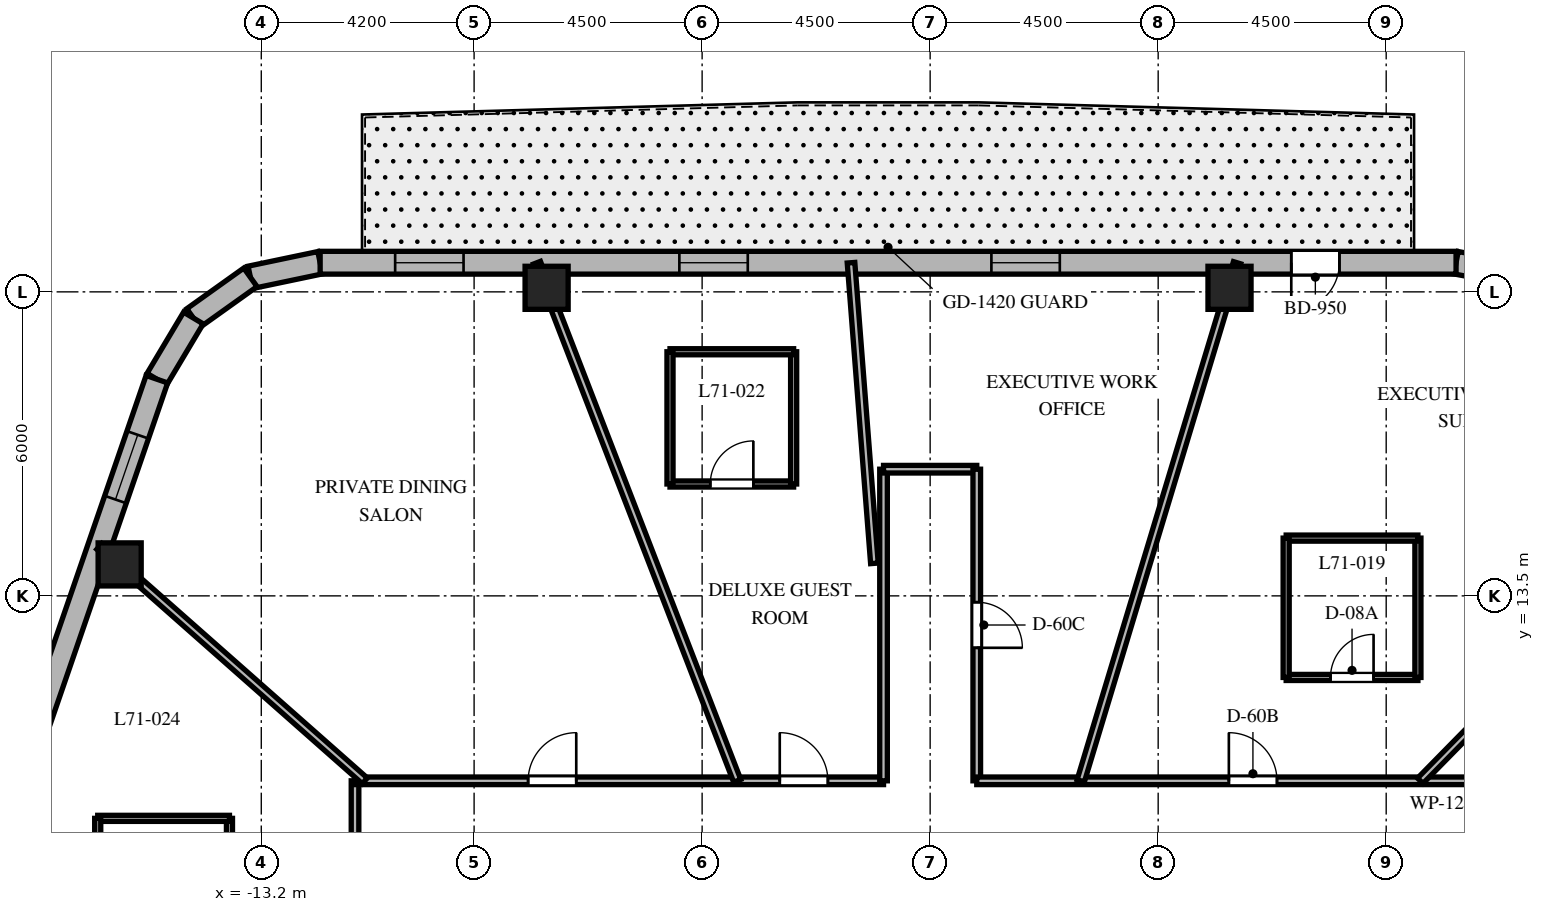
"""IFC4 building model, lengths in metres.
Left out: names, types, materials, properties, quantities, classifications, styles, units other than length and angle.
Written with IfcOpenShell. Run it as: python <this file> out.ifc"""

import sys

from ifc_helpers import new_model, si_unit, direction, frame, frame_2d, origin, origin_2d, place, context, subcontext, project, spatial, rectangle, extrude, element, fill, save


model = new_model("IFC4")
c1 = context("Model", 3, precision=1e-05, world=origin(), true_north=direction((0.0, 1.0)))
c2 = subcontext(c1, "Body", "Model", "MODEL_VIEW")
j1 = project(units=[si_unit("LENGTHUNIT", "METRE"), si_unit("PLANEANGLEUNIT", "RADIAN")], contexts=[c1])
p1 = place(None, origin())
s1 = spatial("IfcSite", under=j1, at=p1, CompositionType="ELEMENT")
p2 = place(p1, origin())
s2 = spatial("IfcBuilding", under=s1, at=p2, CompositionType="ELEMENT")
p3 = place(p2, frame((0.0, 0.0, 284.7)))
s3 = spatial("IfcBuildingStorey", under=s2, at=p3, CompositionType="ELEMENT", Elevation=284.7)
for number, where, z_axis, x_axis in (
    (1, (5.908, 19.58, 0.0), (0.0, 0.0, 1.0), (1.0, 0.0, 0.0)),
    (2, (-7.569, 19.58, 0.0), (0.0, 0.0, 1.0), (1.0, 0.0, 0.0)),
    (3, (-15.995, 14.121, 0.0), (0.0, 0.0, 1.0), (1.0, 0.0, 0.0)),
):
    element("IfcColumn", number, at=place(p3, frame(where, z_axis=z_axis, x_axis=x_axis)), inside=s3, PredefinedType="COLUMN", context=c2, shape_type="SweptSolid", body=[
        extrude(rectangle(XDim=0.85, YDim=0.85, at=origin_2d()), origin(), (0.0, 0.0, 1.0), 3.9),
    ])
p4 = place(p3, frame((11.626, 19.84, 0.0), z_axis=(0.0, 0.0, 1.0), x_axis=(-0.982701956681, 0.185194126083, 0.0)))
e4 = element("IfcWall", 4, at=p4, inside=s3, PredefinedType="SOLIDWALL", context=c2, shape_type="SweptSolid", body=[
    extrude(rectangle(XDim=1.27, YDim=0.45, at=frame_2d((0.635, 0.0))), origin(), (0.0, 0.0, 1.0), 3.58),
])
p5 = place(p3, frame((-12.038, 20.075, 0.0), z_axis=(0.0, 0.0, 1.0), x_axis=(-0.978750122553, -0.205056571711, 0.0)))
e5 = element("IfcWall", 5, at=p5, inside=s3, PredefinedType="SOLIDWALL", context=c2, shape_type="SweptSolid", body=[
    extrude(rectangle(XDim=1.406, YDim=0.45, at=frame_2d((0.703, 0.0))), origin(), (0.0, 0.0, 1.0), 3.58),
])
p6 = place(p3, frame((-13.415, 19.787, 0.0), z_axis=(0.0, 0.0, 1.0), x_axis=(-0.814055493997, -0.580787097561, 0.0)))
e6 = element("IfcWall", 6, at=p6, inside=s3, PredefinedType="SOLIDWALL", context=c2, shape_type="SweptSolid", body=[
    extrude(rectangle(XDim=1.383, YDim=0.45, at=frame_2d((0.691, 0.0))), origin(), (0.0, 0.0, 1.0), 3.58),
])
p7 = place(p3, frame((-14.54, 18.984, 0.0), z_axis=(0.0, 0.0, 1.0), x_axis=(-0.512374906623, -0.858761873317, 0.0)))
e7 = element("IfcWall", 7, at=p7, inside=s3, PredefinedType="SOLIDWALL", context=c2, shape_type="SweptSolid", body=[
    extrude(rectangle(XDim=1.406, YDim=0.45, at=frame_2d((0.703, 0.0))), origin(), (0.0, 0.0, 1.0), 3.58),
])
p8 = place(p3, frame((10.379, 20.075, 0.0), z_axis=(0.0, 0.0, 1.0), x_axis=(-1.0, 0.0, 0.0)))
e8 = element("IfcWall", 8, at=p8, inside=s3, PredefinedType="SOLIDWALL", context=c2, shape_type="SweptSolid", body=[
    extrude(rectangle(XDim=22.417, YDim=0.45, at=frame_2d((11.208, 0.0))), origin(), (0.0, 0.0, 1.0), 3.58),
])
p9 = place(p8, frame((2.302, 0.0, 0.0)))
e9 = element("IfcOpeningElement", 9, at=p9, cuts=e8, PredefinedType="OPENING", context=c2, shape_type="SweptSolid", body=[
    extrude(rectangle(XDim=0.95, YDim=2.15, at=frame_2d((0.475, 1.075))), frame((0.0, 0.235, 0.0), z_axis=(0.0, -1.0, 0.0), x_axis=(1.0, 0.0, 0.0)), (0.0, 0.0, 1.0), 0.47),
])
p10 = place(p8, frame((7.82, 0.0, 0.8)))
e10 = element("IfcOpeningElement", 10, at=p10, cuts=e8, PredefinedType="OPENING", context=c2, shape_type="SweptSolid", body=[
    extrude(rectangle(XDim=1.35, YDim=1.75, at=frame_2d((0.675, 0.875))), frame((0.0, 0.235, 0.0), z_axis=(0.0, -1.0, 0.0), x_axis=(1.0, 0.0, 0.0)), (0.0, 0.0, 1.0), 0.47),
])
p11 = place(p8, frame((13.978, 0.0, 0.8)))
e11 = element("IfcOpeningElement", 11, at=p11, cuts=e8, PredefinedType="OPENING", context=c2, shape_type="SweptSolid", body=[
    extrude(rectangle(XDim=1.35, YDim=1.75, at=frame_2d((0.675, 0.875))), frame((0.0, 0.235, 0.0), z_axis=(0.0, -1.0, 0.0), x_axis=(1.0, 0.0, 0.0)), (0.0, 0.0, 1.0), 0.47),
])
p12 = place(p8, frame((19.587, 0.0, 0.8)))
e12 = element("IfcOpeningElement", 12, at=p12, cuts=e8, PredefinedType="OPENING", context=c2, shape_type="SweptSolid", body=[
    extrude(rectangle(XDim=1.35, YDim=1.75, at=frame_2d((0.675, 0.875))), frame((0.0, 0.235, 0.0), z_axis=(0.0, -1.0, 0.0), x_axis=(1.0, 0.0, 0.0)), (0.0, 0.0, 1.0), 0.47),
])
p13 = place(p3, frame((-15.26, 17.776, 0.0), z_axis=(0.0, 0.0, 1.0), x_axis=(-0.325407437101, -0.945573899745, 0.0)))
e13 = element("IfcWall", 13, at=p13, inside=s3, PredefinedType="SOLIDWALL", context=c2, shape_type="SweptSolid", body=[
    extrude(rectangle(XDim=18.552, YDim=0.45, at=frame_2d((9.276, 0.0))), origin(), (0.0, 0.0, 1.0), 3.58),
])
p14 = place(p13, frame((1.161, 0.0, 0.8)))
e14 = element("IfcOpeningElement", 14, at=p14, cuts=e13, PredefinedType="OPENING", context=c2, shape_type="SweptSolid", body=[
    extrude(rectangle(XDim=1.35, YDim=1.75, at=frame_2d((0.675, 0.875))), frame((0.0, 0.235, 0.0), z_axis=(0.0, -1.0, 0.0), x_axis=(1.0, 0.0, 0.0)), (0.0, 0.0, 1.0), 0.47),
])
p15 = place(p13, frame((8.548, 0.0, 0.8)))
e15 = element("IfcOpeningElement", 15, at=p15, cuts=e13, PredefinedType="OPENING", context=c2, shape_type="SweptSolid", body=[
    extrude(rectangle(XDim=1.35, YDim=1.75, at=frame_2d((0.675, 0.875))), frame((0.0, 0.235, 0.0), z_axis=(0.0, -1.0, 0.0), x_axis=(1.0, 0.0, 0.0)), (0.0, 0.0, 1.0), 0.47),
])
p16 = place(p13, frame((15.987, 0.0, 0.8)))
e16 = element("IfcOpeningElement", 16, at=p16, cuts=e13, PredefinedType="OPENING", context=c2, shape_type="SweptSolid", body=[
    extrude(rectangle(XDim=1.35, YDim=1.75, at=frame_2d((0.675, 0.875))), frame((0.0, 0.235, 0.0), z_axis=(0.0, -1.0, 0.0), x_axis=(1.0, 0.0, 0.0)), (0.0, 0.0, 1.0), 0.47),
])
p17 = place(p3, frame((-11.35, 4.4, 0.0), z_axis=(0.0, 0.0, 1.0), x_axis=(0.0, 1.0, 0.0)))
e17 = element("IfcWall", 17, at=p17, inside=s3, PredefinedType="PARTITIONING", context=c2, shape_type="SweptSolid", body=[
    extrude(rectangle(XDim=5.45, YDim=0.15, at=frame_2d((2.725, 0.0))), origin(), (0.0, 0.0, 1.0), 3.07),
])
p18 = place(p3, frame((-11.35, 9.85, 0.0), z_axis=(0.0, 0.0, 1.0), x_axis=(1.0, 0.0, 0.0)))
e18 = element("IfcWall", 18, at=p18, inside=s3, PredefinedType="PARTITIONING", context=c2, shape_type="SweptSolid", body=[
    extrude(rectangle(XDim=10.43, YDim=0.15, at=frame_2d((5.215, 0.0))), origin(), (0.0, 0.0, 1.0), 3.07),
])
p19 = place(p18, frame((8.382, 0.0, 0.0)))
e19 = element("IfcOpeningElement", 19, at=p19, cuts=e18, PredefinedType="OPENING", context=c2, shape_type="SweptSolid", body=[
    extrude(rectangle(XDim=0.95, YDim=2.03, at=frame_2d((0.475, 1.015))), frame((0.0, 0.085, 0.0), z_axis=(0.0, -1.0, 0.0), x_axis=(1.0, 0.0, 0.0)), (0.0, 0.0, 1.0), 0.17),
])
p20 = place(p18, frame((3.416, 0.0, 0.0)))
e20 = element("IfcOpeningElement", 20, at=p20, cuts=e18, PredefinedType="OPENING", context=c2, shape_type="SweptSolid", body=[
    extrude(rectangle(XDim=0.95, YDim=2.03, at=frame_2d((0.475, 1.015))), frame((0.0, 0.085, 0.0), z_axis=(0.0, -1.0, 0.0), x_axis=(1.0, 0.0, 0.0)), (0.0, 0.0, 1.0), 0.17),
])
p21 = place(p3, frame((-0.92, 9.85, 0.0), z_axis=(0.0, 0.0, 1.0), x_axis=(0.0, 1.0, 0.0)))
e21 = element("IfcWall", 21, at=p21, inside=s3, PredefinedType="PARTITIONING", context=c2, shape_type="SweptSolid", body=[
    extrude(rectangle(XDim=6.15, YDim=0.15, at=frame_2d((3.075, 0.0))), origin(), (0.0, 0.0, 1.0), 3.021),
])
p22 = place(p3, frame((-0.92, 16.0, 0.0), z_axis=(0.0, 0.0, 1.0), x_axis=(1.0, 0.0, 0.0)))
e22 = element("IfcWall", 22, at=p22, inside=s3, PredefinedType="PARTITIONING", context=c2, shape_type="SweptSolid", body=[
    extrude(rectangle(XDim=1.84, YDim=0.15, at=frame_2d((0.92, 0.0))), origin(), (0.0, 0.0, 1.0), 3.58),
])
p23 = place(p3, frame((0.92, 16.0, 0.0), z_axis=(0.0, 0.0, 1.0), x_axis=(0.0, -1.0, 0.0)))
e23 = element("IfcWall", 23, at=p23, inside=s3, PredefinedType="PARTITIONING", context=c2, shape_type="SweptSolid", body=[
    extrude(rectangle(XDim=6.15, YDim=0.15, at=frame_2d((3.075, 0.0))), origin(), (0.0, 0.0, 1.0), 3.021),
])
p24 = place(p23, frame((2.625, 0.0, 0.0)))
e24 = element("IfcOpeningElement", 24, at=p24, cuts=e23, PredefinedType="OPENING", context=c2, shape_type="SweptSolid", body=[
    extrude(rectangle(XDim=0.9, YDim=2.03, at=frame_2d((0.45, 1.015))), frame((0.0, 0.085, 0.0), z_axis=(0.0, -1.0, 0.0), x_axis=(1.0, 0.0, 0.0)), (0.0, 0.0, 1.0), 0.17),
])
p25 = place(p3, frame((0.92, 9.85, 0.0), z_axis=(0.0, 0.0, 1.0), x_axis=(1.0, 0.0, 0.0)))
e25 = element("IfcWall", 25, at=p25, inside=s3, PredefinedType="PARTITIONING", context=c2, shape_type="SweptSolid", body=[
    extrude(rectangle(XDim=10.43, YDim=0.15, at=frame_2d((5.215, 0.0))), origin(), (0.0, 0.0, 1.0), 3.07),
])
p26 = place(p25, frame((4.975, 0.0, 0.0)))
e26 = element("IfcOpeningElement", 26, at=p26, cuts=e25, PredefinedType="OPENING", context=c2, shape_type="SweptSolid", body=[
    extrude(rectangle(XDim=0.95, YDim=2.03, at=frame_2d((0.475, 1.015))), frame((0.0, 0.085, 0.0), z_axis=(0.0, -1.0, 0.0), x_axis=(1.0, 0.0, 0.0)), (0.0, 0.0, 1.0), 0.17),
])
p27 = place(p3, frame((9.672, 9.85, 0.0), z_axis=(0.0, 0.0, 1.0), x_axis=(0.700629771301, 0.713524998558, 0.0)))
e27 = element("IfcWall", 27, at=p27, inside=s3, PredefinedType="PARTITIONING", context=c2, shape_type="SweptSolid", body=[
    extrude(rectangle(XDim=7.459, YDim=0.15, at=frame_2d((3.73, 0.0))), origin(), (0.0, 0.0, 1.0), 2.92),
])
p28 = place(p3, frame((2.972, 9.85, 0.0), z_axis=(0.0, 0.0, 1.0), x_axis=(0.288872169679, 0.957367677324, 0.0)))
e28 = element("IfcWall", 28, at=p28, inside=s3, PredefinedType="PARTITIONING", context=c2, shape_type="SweptSolid", body=[
    extrude(rectangle(XDim=10.68, YDim=0.15, at=frame_2d((5.34, 0.0))), origin(), (0.0, 0.0, 1.0), 2.92),
])
p29 = place(p3, frame((-1.1, 14.142, 0.0), z_axis=(0.0, 0.0, 1.0), x_axis=(-0.077534071454, 0.996989702938, 0.0)))
e29 = element("IfcWall", 29, at=p29, inside=s3, PredefinedType="PARTITIONING", context=c2, shape_type="SweptSolid", body=[
    extrude(rectangle(XDim=5.951, YDim=0.15, at=frame_2d((2.976, 0.0))), origin(), (0.0, 0.0, 1.0), 2.92),
])
p30 = place(p3, frame((-3.808, 9.85, 0.0), z_axis=(0.0, 0.0, 1.0), x_axis=(-0.360587327934, 0.932725457427, 0.0)))
e30 = element("IfcWall", 30, at=p30, inside=s3, PredefinedType="PARTITIONING", context=c2, shape_type="SweptSolid", body=[
    extrude(rectangle(XDim=10.962, YDim=0.15, at=frame_2d((5.481, 0.0))), origin(), (0.0, 0.0, 1.0), 2.92),
])
p31 = place(p3, frame((-11.157, 9.85, 0.0), z_axis=(0.0, 0.0, 1.0), x_axis=(-0.74966962095, 0.661812253909, 0.0)))
e31 = element("IfcWall", 31, at=p31, inside=s3, PredefinedType="PARTITIONING", context=c2, shape_type="SweptSolid", body=[
    extrude(rectangle(XDim=6.989, YDim=0.15, at=frame_2d((3.494, 0.0))), origin(), (0.0, 0.0, 1.0), 2.92),
])
p32 = place(p3, frame((7.026, 11.89, 0.0), z_axis=(0.0, 0.0, 1.0), x_axis=(1.0, 0.0, 0.0)))
e32 = element("IfcWall", 32, at=p32, inside=s3, PredefinedType="PARTITIONING", context=c2, shape_type="SweptSolid", body=[
    extrude(rectangle(XDim=2.6, YDim=0.12, at=frame_2d((1.3, 0.0))), origin(), (0.0, 0.0, 1.0), 3.021),
])
p33 = place(p32, frame((0.875, 0.0, 0.0)))
e33 = element("IfcOpeningElement", 33, at=p33, cuts=e32, PredefinedType="OPENING", context=c2, shape_type="SweptSolid", body=[
    extrude(rectangle(XDim=0.85, YDim=2.03, at=frame_2d((0.425, 1.015))), frame((0.0, 0.07, 0.0), z_axis=(0.0, -1.0, 0.0), x_axis=(1.0, 0.0, 0.0)), (0.0, 0.0, 1.0), 0.14),
])
p34 = place(p3, frame((9.626, 11.89, 0.0), z_axis=(0.0, 0.0, 1.0), x_axis=(0.0, 1.0, 0.0)))
e34 = element("IfcWall", 34, at=p34, inside=s3, PredefinedType="PARTITIONING", context=c2, shape_type="SweptSolid", body=[
    extrude(rectangle(XDim=2.75, YDim=0.12, at=frame_2d((1.375, 0.0))), origin(), (0.0, 0.0, 1.0), 3.152),
])
p35 = place(p3, frame((9.626, 14.64, 0.0), z_axis=(0.0, 0.0, 1.0), x_axis=(-1.0, 0.0, 0.0)))
e35 = element("IfcWall", 35, at=p35, inside=s3, PredefinedType="PARTITIONING", context=c2, shape_type="SweptSolid", body=[
    extrude(rectangle(XDim=2.6, YDim=0.12, at=frame_2d((1.3, 0.0))), origin(), (0.0, 0.0, 1.0), 3.152),
])
p36 = place(p3, frame((7.026, 14.64, 0.0), z_axis=(0.0, 0.0, 1.0), x_axis=(0.0, -1.0, 0.0)))
e36 = element("IfcWall", 36, at=p36, inside=s3, PredefinedType="PARTITIONING", context=c2, shape_type="SweptSolid", body=[
    extrude(rectangle(XDim=2.75, YDim=0.12, at=frame_2d((1.375, 0.0))), origin(), (0.0, 0.0, 1.0), 3.021),
])
p37 = place(p3, frame((-5.134, 15.708, 0.0), z_axis=(0.0, 0.0, 1.0), x_axis=(1.0, 0.0, 0.0)))
e37 = element("IfcWall", 37, at=p37, inside=s3, PredefinedType="PARTITIONING", context=c2, shape_type="SweptSolid", body=[
    extrude(rectangle(XDim=2.44, YDim=0.12, at=frame_2d((1.22, 0.0))), origin(), (0.0, 0.0, 1.0), 3.021),
])
p38 = place(p37, frame((0.795, 0.0, 0.0)))
e38 = element("IfcOpeningElement", 38, at=p38, cuts=e37, PredefinedType="OPENING", context=c2, shape_type="SweptSolid", body=[
    extrude(rectangle(XDim=0.85, YDim=2.03, at=frame_2d((0.425, 1.015))), frame((0.0, 0.07, 0.0), z_axis=(0.0, -1.0, 0.0), x_axis=(1.0, 0.0, 0.0)), (0.0, 0.0, 1.0), 0.14),
])
p39 = place(p3, frame((-2.694, 15.708, 0.0), z_axis=(0.0, 0.0, 1.0), x_axis=(0.0, 1.0, 0.0)))
e39 = element("IfcWall", 39, at=p39, inside=s3, PredefinedType="PARTITIONING", context=c2, shape_type="SweptSolid", body=[
    extrude(rectangle(XDim=2.61, YDim=0.12, at=frame_2d((1.305, 0.0))), origin(), (0.0, 0.0, 1.0), 3.021),
])
p40 = place(p3, frame((-2.694, 18.318, 0.0), z_axis=(0.0, 0.0, 1.0), x_axis=(-1.0, 0.0, 0.0)))
e40 = element("IfcWall", 40, at=p40, inside=s3, PredefinedType="PARTITIONING", context=c2, shape_type="SweptSolid", body=[
    extrude(rectangle(XDim=2.44, YDim=0.12, at=frame_2d((1.22, 0.0))), origin(), (0.0, 0.0, 1.0), 3.58),
])
p41 = place(p3, frame((-5.134, 18.318, 0.0), z_axis=(0.0, 0.0, 1.0), x_axis=(0.0, -1.0, 0.0)))
e41 = element("IfcWall", 41, at=p41, inside=s3, PredefinedType="PARTITIONING", context=c2, shape_type="SweptSolid", body=[
    extrude(rectangle(XDim=2.61, YDim=0.12, at=frame_2d((1.305, 0.0))), origin(), (0.0, 0.0, 1.0), 3.021),
])
p42 = place(p3, frame((-13.828, 6.359, 0.0), z_axis=(0.0, 0.0, 1.0), x_axis=(0.0, 1.0, 0.0)))
e42 = element("IfcWall", 42, at=p42, inside=s3, PredefinedType="PARTITIONING", context=c2, shape_type="SweptSolid", body=[
    extrude(rectangle(XDim=2.75, YDim=0.12, at=frame_2d((1.375, 0.0))), origin(), (0.0, 0.0, 1.0), 3.58),
])
p43 = place(p3, frame((-13.828, 9.109, 0.0), z_axis=(0.0, 0.0, 1.0), x_axis=(-1.0, 0.0, 0.0)))
e43 = element("IfcWall", 43, at=p43, inside=s3, PredefinedType="PARTITIONING", context=c2, shape_type="SweptSolid", body=[
    extrude(rectangle(XDim=2.6, YDim=0.12, at=frame_2d((1.3, 0.0))), origin(), (0.0, 0.0, 1.0), 3.152),
])
p44 = place(p3, frame((-16.428, 9.109, 0.0), z_axis=(0.0, 0.0, 1.0), x_axis=(0.0, -1.0, 0.0)))
e44 = element("IfcWall", 44, at=p44, inside=s3, PredefinedType="PARTITIONING", context=c2, shape_type="SweptSolid", body=[
    extrude(rectangle(XDim=2.75, YDim=0.12, at=frame_2d((1.375, 0.0))), origin(), (0.0, 0.0, 1.0), 3.58),
])
p45 = place(p9, origin())
e45 = element("IfcDoor", 45, at=p45, inside=s3, OperationType="SINGLE_SWING_RIGHT", PredefinedType="DOOR", context=c2, shape_type="SweptSolid", body=[
    extrude(rectangle(XDim=0.95, YDim=2.15, at=frame_2d((0.475, 1.075))), frame((0.0, 0.025, 0.0), z_axis=(0.0, -1.0, 0.0), x_axis=(1.0, 0.0, 0.0)), (0.0, 0.0, 1.0), 0.05),
])
fill(e9, e45)
p46 = place(p10, origin())
e46 = element("IfcWindow", 46, at=p46, inside=s3, PartitioningType="SINGLE_PANEL", PredefinedType="WINDOW", context=c2, shape_type="SweptSolid", body=[
    extrude(rectangle(XDim=1.35, YDim=1.75, at=frame_2d((0.675, 0.875))), frame((0.0, 0.03, 0.0), z_axis=(0.0, -1.0, 0.0), x_axis=(1.0, 0.0, 0.0)), (0.0, 0.0, 1.0), 0.06),
])
fill(e10, e46)
p47 = place(p11, origin())
e47 = element("IfcWindow", 47, at=p47, inside=s3, PartitioningType="SINGLE_PANEL", PredefinedType="WINDOW", context=c2, shape_type="SweptSolid", body=[
    extrude(rectangle(XDim=1.35, YDim=1.75, at=frame_2d((0.675, 0.875))), frame((0.0, 0.03, 0.0), z_axis=(0.0, -1.0, 0.0), x_axis=(1.0, 0.0, 0.0)), (0.0, 0.0, 1.0), 0.06),
])
fill(e11, e47)
p48 = place(p12, origin())
e48 = element("IfcWindow", 48, at=p48, inside=s3, PartitioningType="SINGLE_PANEL", PredefinedType="WINDOW", context=c2, shape_type="SweptSolid", body=[
    extrude(rectangle(XDim=1.35, YDim=1.75, at=frame_2d((0.675, 0.875))), frame((0.0, 0.03, 0.0), z_axis=(0.0, -1.0, 0.0), x_axis=(1.0, 0.0, 0.0)), (0.0, 0.0, 1.0), 0.06),
])
fill(e12, e48)
p49 = place(p14, origin())
e49 = element("IfcWindow", 49, at=p49, inside=s3, PartitioningType="SINGLE_PANEL", PredefinedType="WINDOW", context=c2, shape_type="SweptSolid", body=[
    extrude(rectangle(XDim=1.35, YDim=1.75, at=frame_2d((0.675, 0.875))), frame((0.0, 0.03, 0.0), z_axis=(0.0, -1.0, 0.0), x_axis=(1.0, 0.0, 0.0)), (0.0, 0.0, 1.0), 0.06),
])
fill(e14, e49)
p50 = place(p26, origin())
e50 = element("IfcDoor", 50, at=p50, inside=s3, OperationType="SINGLE_SWING_LEFT", PredefinedType="DOOR", context=c2, shape_type="SweptSolid", body=[
    extrude(rectangle(XDim=0.95, YDim=2.03, at=frame_2d((0.475, 1.015))), frame((0.0, 0.025, 0.0), z_axis=(0.0, -1.0, 0.0), x_axis=(1.0, 0.0, 0.0)), (0.0, 0.0, 1.0), 0.05),
])
fill(e26, e50)
p51 = place(p33, origin())
e51 = element("IfcDoor", 51, at=p51, inside=s3, OperationType="SINGLE_SWING_RIGHT", PredefinedType="DOOR", context=c2, shape_type="SweptSolid", body=[
    extrude(rectangle(XDim=0.85, YDim=2.03, at=frame_2d((0.425, 1.015))), frame((0.0, 0.025, 0.0), z_axis=(0.0, -1.0, 0.0), x_axis=(1.0, 0.0, 0.0)), (0.0, 0.0, 1.0), 0.05),
])
fill(e33, e51)
p52 = place(p24, origin())
e52 = element("IfcDoor", 52, at=p52, inside=s3, OperationType="SINGLE_SWING_RIGHT", PredefinedType="DOOR", context=c2, shape_type="SweptSolid", body=[
    extrude(rectangle(XDim=0.9, YDim=2.03, at=frame_2d((0.45, 1.015))), frame((0.0, 0.025, 0.0), z_axis=(0.0, -1.0, 0.0), x_axis=(1.0, 0.0, 0.0)), (0.0, 0.0, 1.0), 0.05),
])
fill(e24, e52)
p53 = place(p19, origin())
e53 = element("IfcDoor", 53, at=p53, inside=s3, OperationType="SINGLE_SWING_LEFT", PredefinedType="DOOR", context=c2, shape_type="SweptSolid", body=[
    extrude(rectangle(XDim=0.95, YDim=2.03, at=frame_2d((0.475, 1.015))), frame((0.0, 0.025, 0.0), z_axis=(0.0, -1.0, 0.0), x_axis=(1.0, 0.0, 0.0)), (0.0, 0.0, 1.0), 0.05),
])
fill(e19, e53)
p54 = place(p38, origin())
e54 = element("IfcDoor", 54, at=p54, inside=s3, OperationType="SINGLE_SWING_RIGHT", PredefinedType="DOOR", context=c2, shape_type="SweptSolid", body=[
    extrude(rectangle(XDim=0.85, YDim=2.03, at=frame_2d((0.425, 1.015))), frame((0.0, 0.025, 0.0), z_axis=(0.0, -1.0, 0.0), x_axis=(1.0, 0.0, 0.0)), (0.0, 0.0, 1.0), 0.05),
])
fill(e38, e54)
p55 = place(p20, origin())
e55 = element("IfcDoor", 55, at=p55, inside=s3, OperationType="SINGLE_SWING_RIGHT", PredefinedType="DOOR", context=c2, shape_type="SweptSolid", body=[
    extrude(rectangle(XDim=0.95, YDim=2.03, at=frame_2d((0.475, 1.015))), frame((0.0, 0.025, 0.0), z_axis=(0.0, -1.0, 0.0), x_axis=(1.0, 0.0, 0.0)), (0.0, 0.0, 1.0), 0.05),
])
fill(e20, e55)
save(model, sys.argv[1])
